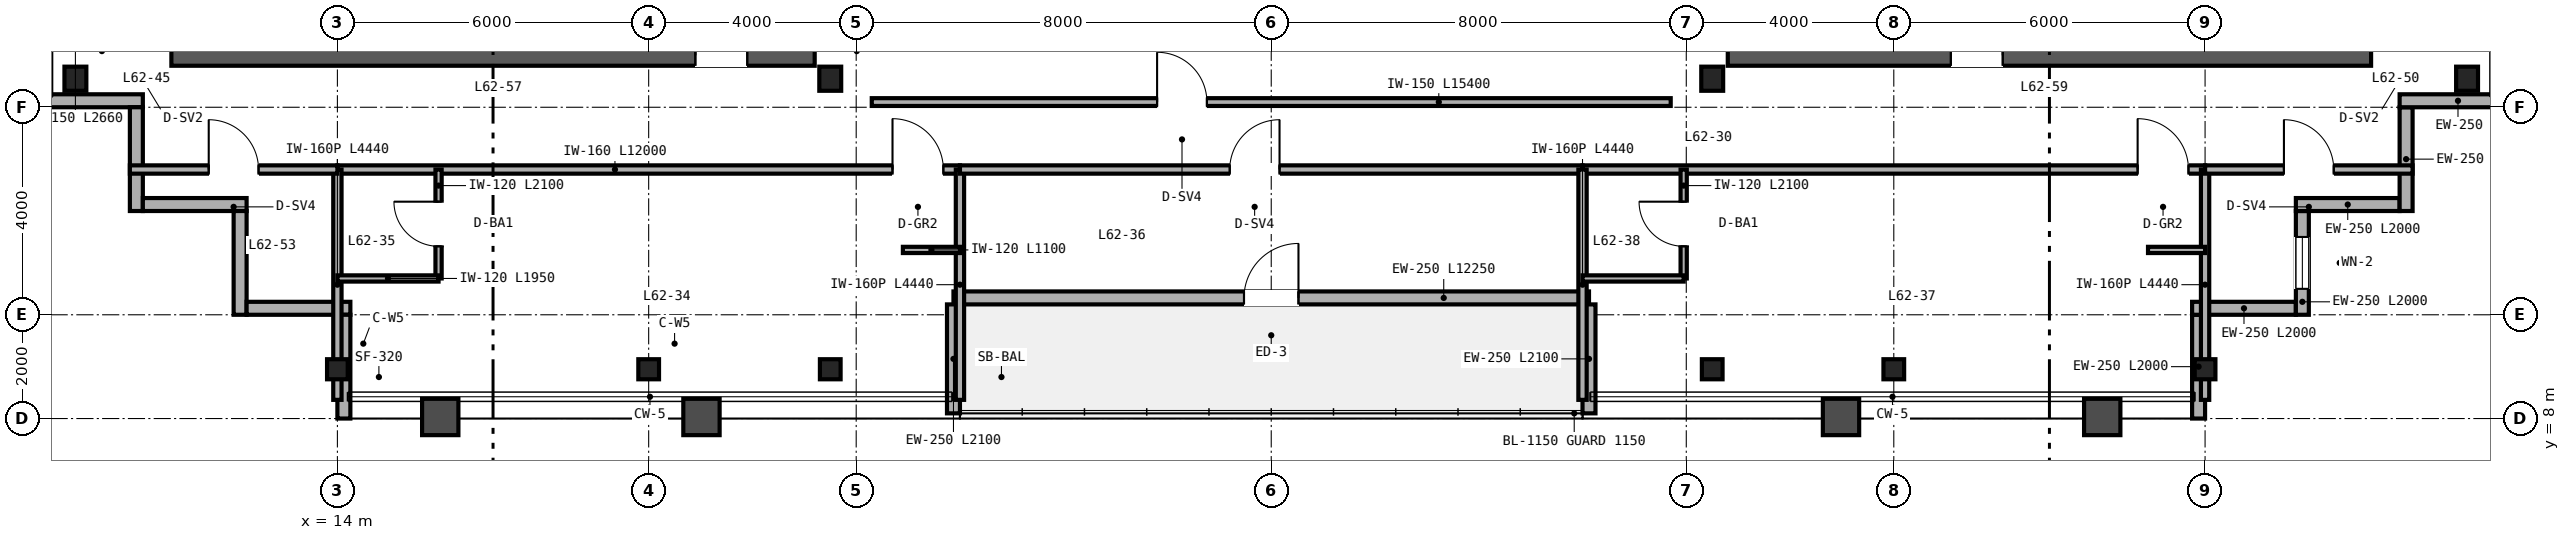
"""IFC4 building model, lengths in metres.
Left out: names, types, materials, properties, quantities, classifications, styles, units other than length and angle.
Written with IfcOpenShell. Run it as: python <this file> out.ifc"""

import sys

from ifc_helpers import new_model, si_unit, direction, frame, frame_2d, origin, origin_2d, place, context, subcontext, project, spatial, rectangle, i_section, extrude, source, transform, mapped, element, fill, save


model = new_model("IFC4")
c1 = context("Model", 3, precision=1e-05, world=origin(), true_north=direction((0.0, 1.0)))
c2 = subcontext(c1, "Body", "Model", "MODEL_VIEW")
j1 = project(units=[si_unit("LENGTHUNIT", "METRE"), si_unit("PLANEANGLEUNIT", "RADIAN")], contexts=[c1])
p1 = place(None, origin())
s1 = spatial("IfcSite", under=j1, at=p1, CompositionType="ELEMENT")
p2 = place(p1, origin())
s2 = spatial("IfcBuilding", under=s1, at=p2, CompositionType="ELEMENT")
p3 = place(p2, frame((0.0, 0.0, 247.2)))
s3 = spatial("IfcBuildingStorey", under=s2, at=p3, CompositionType="ELEMENT", Elevation=247.2)
p4 = place(p3, frame((10.8, 15.0, 0.0), z_axis=(0.0, 0.0, 1.0), x_axis=(1.0, 0.0, 0.0)))
e1 = element("IfcWall", 1, at=p4, inside=s3, PredefinedType="SHEAR", context=c2, shape_type="SweptSolid", body=[
    extrude(rectangle(XDim=12.4, YDim=0.4, at=frame_2d((6.2, 0.0))), origin(), (0.0, 0.0, 1.0), 3.38),
])
p5 = place(p4, frame((10.1, 0.0, 0.0)))
e2 = element("IfcOpeningElement", 2, at=p5, cuts=e1, PredefinedType="OPENING", context=c2, shape_type="SweptSolid", body=[
    extrude(rectangle(XDim=1.0, YDim=2.15, at=frame_2d((0.5, 1.075))), frame((0.0, 0.21, 0.0), z_axis=(0.0, -1.0, 0.0), x_axis=(1.0, 0.0, 0.0)), (0.0, 0.0, 1.0), 0.42),
])
p6 = place(p3, frame((40.8, 15.0, 0.0), z_axis=(0.0, 0.0, 1.0), x_axis=(1.0, 0.0, 0.0)))
e3 = element("IfcWall", 3, at=p6, inside=s3, PredefinedType="SHEAR", context=c2, shape_type="SweptSolid", body=[
    extrude(rectangle(XDim=12.4, YDim=0.4, at=frame_2d((6.2, 0.0))), origin(), (0.0, 0.0, 1.0), 3.38),
])
p7 = place(p6, frame((4.3, 0.0, 0.0)))
e4 = element("IfcOpeningElement", 4, at=p7, cuts=e3, PredefinedType="OPENING", context=c2, shape_type="SweptSolid", body=[
    extrude(rectangle(XDim=1.0, YDim=2.15, at=frame_2d((0.5, 1.075))), frame((0.0, 0.21, 0.0), z_axis=(0.0, -1.0, 0.0), x_axis=(1.0, 0.0, 0.0)), (0.0, 0.0, 1.0), 0.42),
])
m1 = source(origin(), c2, "Body", "SweptSolid", [
    extrude(i_section(OverallWidth=0.422, OverallDepth=0.465, WebThickness=0.045, FlangeThickness=0.073, FilletRadius=0.025, at=origin_2d()), origin(), (0.0, 0.0, 1.0), 3.38),
])
for number, where, z_axis, x_axis in (
    (5, (8.95, 14.55, 0.0), (0.0, 0.0, 1.0), (1.0, 0.0, 0.0)),
    (6, (23.5, 14.55, 0.0), (0.0, 0.0, 1.0), (1.0, 0.0, 0.0)),
    (7, (40.5, 14.55, 0.0), (0.0, 0.0, 1.0), (1.0, 0.0, 0.0)),
    (8, (55.05, 14.55, 0.0), (0.0, 0.0, 1.0), (1.0, 0.0, 0.0)),
):
    element("IfcColumn", number, at=place(p3, frame(where, z_axis=z_axis, x_axis=x_axis)), inside=s3, PredefinedType="COLUMN", context=c2, shape_type="MappedRepresentation", body=[
        mapped(m1, transform((0.0, 0.0, 0.0), scale=1.0)),
    ])
m2 = source(origin(), c2, "Body", "SweptSolid", [
    extrude(i_section(OverallWidth=0.399, OverallDepth=0.387, WebThickness=0.021, FlangeThickness=0.033, FilletRadius=0.025, at=origin_2d()), origin(), (0.0, 0.0, 1.0), 3.38),
])
for number, where, z_axis, x_axis in (
    (9, (14.0, 8.95, 0.0), (0.0, 0.0, 1.0), (1.0, 0.0, 0.0)),
    (10, (20.0, 8.95, 0.0), (0.0, 0.0, 1.0), (1.0, 0.0, 0.0)),
    (11, (23.5, 8.95, 0.0), (0.0, 0.0, 1.0), (1.0, 0.0, 0.0)),
    (12, (40.5, 8.95, 0.0), (0.0, 0.0, 1.0), (1.0, 0.0, 0.0)),
    (13, (44.0, 8.95, 0.0), (0.0, 0.0, 1.0), (1.0, 0.0, 0.0)),
    (14, (50.0, 8.95, 0.0), (0.0, 0.0, 1.0), (1.0, 0.0, 0.0)),
):
    element("IfcColumn", number, at=place(p3, frame(where, z_axis=z_axis, x_axis=x_axis)), inside=s3, PredefinedType="COLUMN", context=c2, shape_type="MappedRepresentation", body=[
        mapped(m2, transform((0.0, 0.0, 0.0), scale=1.0)),
    ])
p8 = place(p3, frame((49.875, 8.0, 0.0), z_axis=(0.0, 0.0, 1.0), x_axis=(0.0, 1.0, 0.0)))
e15 = element("IfcWall", 15, at=p8, inside=s3, PredefinedType="SOLIDWALL", context=c2, shape_type="SweptSolid", body=[
    extrude(rectangle(XDim=2.0, YDim=0.25, at=frame_2d((1.0, 0.0))), origin(), (0.0, 0.0, 1.0), 2.687),
])
p9 = place(p3, frame((49.75, 10.125, 0.0), z_axis=(0.0, 0.0, 1.0), x_axis=(1.0, 0.0, 0.0)))
e16 = element("IfcWall", 16, at=p9, inside=s3, PredefinedType="SOLIDWALL", context=c2, shape_type="SweptSolid", body=[
    extrude(rectangle(XDim=2.0, YDim=0.25, at=frame_2d((1.0, 0.0))), origin(), (0.0, 0.0, 1.0), 3.38),
])
p10 = place(p3, frame((51.875, 10.0, 0.0), z_axis=(0.0, 0.0, 1.0), x_axis=(0.0, 1.0, 0.0)))
e17 = element("IfcWall", 17, at=p10, inside=s3, PredefinedType="SOLIDWALL", context=c2, shape_type="SweptSolid", body=[
    extrude(rectangle(XDim=2.0, YDim=0.25, at=frame_2d((1.0, 0.0))), origin(), (0.0, 0.0, 1.0), 3.38),
])
p11 = place(p10, frame((0.5, 0.0, 0.85)))
e18 = element("IfcOpeningElement", 18, at=p11, cuts=e17, PredefinedType="OPENING", context=c2, shape_type="SweptSolid", body=[
    extrude(rectangle(XDim=1.0, YDim=1.9, at=frame_2d((0.5, 0.95))), frame((0.0, 0.135, 0.0), z_axis=(0.0, -1.0, 0.0), x_axis=(1.0, 0.0, 0.0)), (0.0, 0.0, 1.0), 0.27),
])
for number, where, z_axis, x_axis in (
    (19, (51.75, 12.125, 0.0), (0.0, 0.0, 1.0), (1.0, 0.0, 0.0)),
    (20, (53.875, 12.0, 0.0), (0.0, 0.0, 1.0), (0.0, 1.0, 0.0)),
):
    element("IfcWall", number, at=place(p3, frame(where, z_axis=z_axis, x_axis=x_axis)), inside=s3, PredefinedType="SOLIDWALL", context=c2, shape_type="SweptSolid", body=[
        extrude(rectangle(XDim=2.0, YDim=0.25, at=frame_2d((1.0, 0.0))), origin(), (0.0, 0.0, 1.0), 3.38),
    ])
for number, where, z_axis, x_axis in (
    (21, (53.75, 14.125, 0.0), (0.0, 0.0, 1.0), (1.0, 0.0, 0.0)),
    (22, (8.0, 14.125, 0.0), (0.0, 0.0, 1.0), (1.0, 0.0, 0.0)),
):
    element("IfcWall", number, at=place(p3, frame(where, z_axis=z_axis, x_axis=x_axis)), inside=s3, PredefinedType="SOLIDWALL", context=c2, shape_type="SweptSolid", body=[
        extrude(rectangle(XDim=2.25, YDim=0.25, at=frame_2d((1.125, 0.0))), origin(), (0.0, 0.0, 1.0), 3.38),
    ])
for number, where, z_axis, x_axis in (
    (23, (10.125, 14.0, 0.0), (0.0, 0.0, 1.0), (0.0, -1.0, 0.0)),
    (24, (10.25, 12.125, 0.0), (0.0, 0.0, 1.0), (1.0, 0.0, 0.0)),
    (25, (12.125, 12.0, 0.0), (0.0, 0.0, 1.0), (0.0, -1.0, 0.0)),
    (26, (12.25, 10.125, 0.0), (0.0, 0.0, 1.0), (1.0, 0.0, 0.0)),
):
    element("IfcWall", number, at=place(p3, frame(where, z_axis=z_axis, x_axis=x_axis)), inside=s3, PredefinedType="SOLIDWALL", context=c2, shape_type="SweptSolid", body=[
        extrude(rectangle(XDim=2.0, YDim=0.25, at=frame_2d((1.0, 0.0))), origin(), (0.0, 0.0, 1.0), 3.38),
    ])
p12 = place(p3, frame((14.125, 10.0, 0.0), z_axis=(0.0, 0.0, 1.0), x_axis=(0.0, -1.0, 0.0)))
e27 = element("IfcWall", 27, at=p12, inside=s3, PredefinedType="SOLIDWALL", context=c2, shape_type="SweptSolid", body=[
    extrude(rectangle(XDim=2.0, YDim=0.25, at=frame_2d((1.0, 0.0))), origin(), (0.0, 0.0, 1.0), 2.687),
])
p13 = place(p3, frame((25.875, 10.325, 0.0), z_axis=(0.0, 0.0, 1.0), x_axis=(1.0, 0.0, 0.0)))
e28 = element("IfcWall", 28, at=p13, inside=s3, PredefinedType="SOLIDWALL", context=c2, shape_type="SweptSolid", body=[
    extrude(rectangle(XDim=12.25, YDim=0.25, at=frame_2d((6.125, 0.0))), origin(), (0.0, 0.0, 1.0), 3.38),
])
p14 = place(p13, frame((5.6, 0.0, 0.0)))
e29 = element("IfcOpeningElement", 29, at=p14, cuts=e28, PredefinedType="OPENING", context=c2, shape_type="SweptSolid", body=[
    extrude(rectangle(XDim=1.05, YDim=2.15, at=frame_2d((0.525, 1.075))), frame((0.0, 0.135, 0.0), z_axis=(0.0, -1.0, 0.0), x_axis=(1.0, 0.0, 0.0)), (0.0, 0.0, 1.0), 0.27),
])
for number, where, z_axis, x_axis in (
    (30, (25.875, 8.1, 0.0), (0.0, 0.0, 1.0), (0.0, 1.0, 0.0)),
    (31, (38.125, 8.1, 0.0), (0.0, 0.0, 1.0), (0.0, 1.0, 0.0)),
):
    element("IfcWall", number, at=place(p3, frame(where, z_axis=z_axis, x_axis=x_axis)), inside=s3, PredefinedType="SOLIDWALL", context=c2, shape_type="SweptSolid", body=[
        extrude(rectangle(XDim=2.1, YDim=0.25, at=frame_2d((1.05, 0.0))), origin(), (0.0, 0.0, 1.0), 2.432),
    ])
p15 = place(p3, frame((24.3, 14.1, 0.0), z_axis=(0.0, 0.0, 1.0), x_axis=(1.0, 0.0, 0.0)))
e32 = element("IfcWall", 32, at=p15, inside=s3, PredefinedType="PARTITIONING", context=c2, shape_type="SweptSolid", body=[
    extrude(rectangle(XDim=15.4, YDim=0.15, at=frame_2d((7.7, 0.0))), origin(), (0.0, 0.0, 1.0), 2.923),
])
p16 = place(p15, frame((5.5, 0.0, 0.0)))
e33 = element("IfcOpeningElement", 33, at=p16, cuts=e32, PredefinedType="OPENING", context=c2, shape_type="SweptSolid", body=[
    extrude(rectangle(XDim=0.96, YDim=2.15, at=frame_2d((0.48, 1.075))), frame((0.0, 0.085, 0.0), z_axis=(0.0, -1.0, 0.0), x_axis=(1.0, 0.0, 0.0)), (0.0, 0.0, 1.0), 0.17),
])
p17 = place(p3, frame((14.0, 12.8, 0.0), z_axis=(0.0, 0.0, 1.0), x_axis=(1.0, 0.0, 0.0)))
e34 = element("IfcWall", 34, at=p17, inside=s3, PredefinedType="PARTITIONING", context=c2, shape_type="SweptSolid", body=[
    extrude(rectangle(XDim=12.0, YDim=0.16, at=frame_2d((6.0, 0.0))), origin(), (0.0, 0.0, 1.0), 2.923),
])
p18 = place(p17, frame((10.7, 0.0, 0.0)))
e35 = element("IfcOpeningElement", 35, at=p18, cuts=e34, PredefinedType="OPENING", context=c2, shape_type="SweptSolid", body=[
    extrude(rectangle(XDim=0.98, YDim=2.2, at=frame_2d((0.49, 1.1))), frame((0.0, 0.09, 0.0), z_axis=(0.0, -1.0, 0.0), x_axis=(1.0, 0.0, 0.0)), (0.0, 0.0, 1.0), 0.18),
])
p19 = place(p3, frame((14.0, 8.36, 0.0), z_axis=(0.0, 0.0, 1.0), x_axis=(0.0, 1.0, 0.0)))
e36 = element("IfcWall", 36, at=p19, inside=s3, PredefinedType="PARTITIONING", context=c2, shape_type="SweptSolid", body=[
    extrude(rectangle(XDim=4.44, YDim=0.16, at=frame_2d((2.22, 0.0))), origin(), (0.0, 0.0, 1.0), 2.687),
])
p20 = place(p3, frame((26.0, 8.36, 0.0), z_axis=(0.0, 0.0, 1.0), x_axis=(0.0, 1.0, 0.0)))
e37 = element("IfcWall", 37, at=p20, inside=s3, PredefinedType="PARTITIONING", context=c2, shape_type="SweptSolid", body=[
    extrude(rectangle(XDim=4.44, YDim=0.16, at=frame_2d((2.22, 0.0))), origin(), (0.0, 0.0, 1.0), 2.432),
])
p21 = place(p3, frame((15.95, 10.7, 0.0), z_axis=(0.0, 0.0, 1.0), x_axis=(0.0, 1.0, 0.0)))
e38 = element("IfcWall", 38, at=p21, inside=s3, PredefinedType="PARTITIONING", context=c2, shape_type="SweptSolid", body=[
    extrude(rectangle(XDim=2.1, YDim=0.12, at=frame_2d((1.05, 0.0))), origin(), (0.0, 0.0, 1.0), 3.38),
])
p22 = place(p21, frame((0.62, 0.0, 0.0)))
e39 = element("IfcOpeningElement", 39, at=p22, cuts=e38, PredefinedType="OPENING", context=c2, shape_type="SweptSolid", body=[
    extrude(rectangle(XDim=0.86, YDim=2.1, at=frame_2d((0.43, 1.05))), frame((0.0, 0.07, 0.0), z_axis=(0.0, -1.0, 0.0), x_axis=(1.0, 0.0, 0.0)), (0.0, 0.0, 1.0), 0.14),
])
p23 = place(p3, frame((14.0, 10.7, 0.0), z_axis=(0.0, 0.0, 1.0), x_axis=(1.0, 0.0, 0.0)))
e40 = element("IfcWall", 40, at=p23, inside=s3, PredefinedType="PARTITIONING", context=c2, shape_type="SweptSolid", body=[
    extrude(rectangle(XDim=1.95, YDim=0.12, at=frame_2d((0.975, 0.0))), origin(), (0.0, 0.0, 1.0), 3.38),
])
p24 = place(p3, frame((24.9, 11.25, 0.0), z_axis=(0.0, 0.0, 1.0), x_axis=(1.0, 0.0, 0.0)))
e41 = element("IfcWall", 41, at=p24, inside=s3, PredefinedType="PARTITIONING", context=c2, shape_type="SweptSolid", body=[
    extrude(rectangle(XDim=1.1, YDim=0.12, at=frame_2d((0.55, 0.0))), origin(), (0.0, 0.0, 1.0), 3.38),
])
p25 = place(p3, frame((26.0, 12.8, 0.0), z_axis=(0.0, 0.0, 1.0), x_axis=(1.0, 0.0, 0.0)))
e42 = element("IfcWall", 42, at=p25, inside=s3, PredefinedType="PARTITIONING", context=c2, shape_type="SweptSolid", body=[
    extrude(rectangle(XDim=12.0, YDim=0.16, at=frame_2d((6.0, 0.0))), origin(), (0.0, 0.0, 1.0), 3.38),
])
p26 = place(p25, frame((5.2, 0.0, 0.0)))
e43 = element("IfcOpeningElement", 43, at=p26, cuts=e42, PredefinedType="OPENING", context=c2, shape_type="SweptSolid", body=[
    extrude(rectangle(XDim=0.96, YDim=2.15, at=frame_2d((0.48, 1.075))), frame((0.0, 0.09, 0.0), z_axis=(0.0, -1.0, 0.0), x_axis=(1.0, 0.0, 0.0)), (0.0, 0.0, 1.0), 0.18),
])
p27 = place(p3, frame((38.0, 12.8, 0.0), z_axis=(0.0, 0.0, 1.0), x_axis=(1.0, 0.0, 0.0)))
e44 = element("IfcWall", 44, at=p27, inside=s3, PredefinedType="PARTITIONING", context=c2, shape_type="SweptSolid", body=[
    extrude(rectangle(XDim=12.0, YDim=0.16, at=frame_2d((6.0, 0.0))), origin(), (0.0, 0.0, 1.0), 2.923),
])
p28 = place(p27, frame((10.7, 0.0, 0.0)))
e45 = element("IfcOpeningElement", 45, at=p28, cuts=e44, PredefinedType="OPENING", context=c2, shape_type="SweptSolid", body=[
    extrude(rectangle(XDim=0.98, YDim=2.2, at=frame_2d((0.49, 1.1))), frame((0.0, 0.09, 0.0), z_axis=(0.0, -1.0, 0.0), x_axis=(1.0, 0.0, 0.0)), (0.0, 0.0, 1.0), 0.18),
])
p29 = place(p3, frame((38.0, 8.36, 0.0), z_axis=(0.0, 0.0, 1.0), x_axis=(0.0, 1.0, 0.0)))
e46 = element("IfcWall", 46, at=p29, inside=s3, PredefinedType="PARTITIONING", context=c2, shape_type="SweptSolid", body=[
    extrude(rectangle(XDim=4.44, YDim=0.16, at=frame_2d((2.22, 0.0))), origin(), (0.0, 0.0, 1.0), 2.432),
])
p30 = place(p3, frame((50.0, 8.36, 0.0), z_axis=(0.0, 0.0, 1.0), x_axis=(0.0, 1.0, 0.0)))
e47 = element("IfcWall", 47, at=p30, inside=s3, PredefinedType="PARTITIONING", context=c2, shape_type="SweptSolid", body=[
    extrude(rectangle(XDim=4.44, YDim=0.16, at=frame_2d((2.22, 0.0))), origin(), (0.0, 0.0, 1.0), 2.687),
])
p31 = place(p3, frame((39.95, 10.7, 0.0), z_axis=(0.0, 0.0, 1.0), x_axis=(0.0, 1.0, 0.0)))
e48 = element("IfcWall", 48, at=p31, inside=s3, PredefinedType="PARTITIONING", context=c2, shape_type="SweptSolid", body=[
    extrude(rectangle(XDim=2.1, YDim=0.12, at=frame_2d((1.05, 0.0))), origin(), (0.0, 0.0, 1.0), 3.38),
])
p32 = place(p31, frame((0.62, 0.0, 0.0)))
e49 = element("IfcOpeningElement", 49, at=p32, cuts=e48, PredefinedType="OPENING", context=c2, shape_type="SweptSolid", body=[
    extrude(rectangle(XDim=0.86, YDim=2.1, at=frame_2d((0.43, 1.05))), frame((0.0, 0.07, 0.0), z_axis=(0.0, -1.0, 0.0), x_axis=(1.0, 0.0, 0.0)), (0.0, 0.0, 1.0), 0.14),
])
p33 = place(p3, frame((38.0, 10.7, 0.0), z_axis=(0.0, 0.0, 1.0), x_axis=(1.0, 0.0, 0.0)))
e50 = element("IfcWall", 50, at=p33, inside=s3, PredefinedType="PARTITIONING", context=c2, shape_type="SweptSolid", body=[
    extrude(rectangle(XDim=1.95, YDim=0.12, at=frame_2d((0.975, 0.0))), origin(), (0.0, 0.0, 1.0), 3.38),
])
p34 = place(p3, frame((48.9, 11.25, 0.0), z_axis=(0.0, 0.0, 1.0), x_axis=(1.0, 0.0, 0.0)))
e51 = element("IfcWall", 51, at=p34, inside=s3, PredefinedType="PARTITIONING", context=c2, shape_type="SweptSolid", body=[
    extrude(rectangle(XDim=1.1, YDim=0.12, at=frame_2d((0.55, 0.0))), origin(), (0.0, 0.0, 1.0), 3.38),
])
p35 = place(p3, frame((10.0, 12.8, 0.0), z_axis=(0.0, 0.0, 1.0), x_axis=(1.0, 0.0, 0.0)))
e52 = element("IfcWall", 52, at=p35, inside=s3, PredefinedType="PARTITIONING", context=c2, shape_type="SweptSolid", body=[
    extrude(rectangle(XDim=4.0, YDim=0.16, at=frame_2d((2.0, 0.0))), origin(), (0.0, 0.0, 1.0), 3.38),
])
p36 = place(p35, frame((1.52, 0.0, 0.0)))
e53 = element("IfcOpeningElement", 53, at=p36, cuts=e52, PredefinedType="OPENING", context=c2, shape_type="SweptSolid", body=[
    extrude(rectangle(XDim=0.96, YDim=2.15, at=frame_2d((0.48, 1.075))), frame((0.0, 0.09, 0.0), z_axis=(0.0, -1.0, 0.0), x_axis=(1.0, 0.0, 0.0)), (0.0, 0.0, 1.0), 0.18),
])
p37 = place(p3, frame((50.0, 12.8, 0.0), z_axis=(0.0, 0.0, 1.0), x_axis=(1.0, 0.0, 0.0)))
e54 = element("IfcWall", 54, at=p37, inside=s3, PredefinedType="PARTITIONING", context=c2, shape_type="SweptSolid", body=[
    extrude(rectangle(XDim=4.0, YDim=0.16, at=frame_2d((2.0, 0.0))), origin(), (0.0, 0.0, 1.0), 3.38),
])
p38 = place(p37, frame((1.52, 0.0, 0.0)))
e55 = element("IfcOpeningElement", 55, at=p38, cuts=e54, PredefinedType="OPENING", context=c2, shape_type="SweptSolid", body=[
    extrude(rectangle(XDim=0.96, YDim=2.15, at=frame_2d((0.48, 1.075))), frame((0.0, 0.09, 0.0), z_axis=(0.0, -1.0, 0.0), x_axis=(1.0, 0.0, 0.0)), (0.0, 0.0, 1.0), 0.18),
])
m3 = source(origin(), c2, "Body", "SweptSolid", [
    extrude(rectangle(XDim=1.0, YDim=1.9, at=frame_2d((0.5, 0.95))), frame((0.0, 0.03, 0.0), z_axis=(0.0, -1.0, 0.0), x_axis=(1.0, 0.0, 0.0)), (0.0, 0.0, 1.0), 0.06),
])
p39 = place(p11, origin())
e56 = element("IfcWindow", 56, at=p39, inside=s3, PartitioningType="SINGLE_PANEL", PredefinedType="WINDOW", context=c2, shape_type="MappedRepresentation", body=[
    mapped(m3, transform((0.0, 0.0, 0.0), scale=1.0)),
])
fill(e18, e56)
m4 = source(origin(), c2, "Body", "SweptSolid", [
    extrude(rectangle(XDim=1.05, YDim=2.15, at=frame_2d((0.525, 1.075))), frame((0.0, 0.025, 0.0), z_axis=(0.0, -1.0, 0.0), x_axis=(1.0, 0.0, 0.0)), (0.0, 0.0, 1.0), 0.05),
])
p40 = place(p14, origin())
e57 = element("IfcDoor", 57, at=p40, inside=s3, OperationType="SINGLE_SWING_RIGHT", PredefinedType="DOOR", context=c2, shape_type="MappedRepresentation", body=[
    mapped(m4, transform((0.0, 0.0, 0.0), scale=1.0)),
])
fill(e29, e57)
m5 = source(origin(), c2, "Body", "SweptSolid", [
    extrude(rectangle(XDim=1.0, YDim=2.15, at=frame_2d((0.5, 1.075))), frame((0.0, 0.025, 0.0), z_axis=(0.0, -1.0, 0.0), x_axis=(1.0, 0.0, 0.0)), (0.0, 0.0, 1.0), 0.05),
])
p41 = place(p5, origin())
e58 = element("IfcDoor", 58, at=p41, inside=s3, OperationType="SINGLE_SWING_LEFT", PredefinedType="DOOR", context=c2, shape_type="MappedRepresentation", body=[
    mapped(m5, transform((0.0, 0.0, 0.0), scale=1.0)),
])
fill(e2, e58)
p42 = place(p7, origin())
e59 = element("IfcDoor", 59, at=p42, inside=s3, OperationType="SINGLE_SWING_RIGHT", PredefinedType="DOOR", context=c2, shape_type="MappedRepresentation", body=[
    mapped(m5, transform((0.0, 0.0, 0.0), scale=1.0)),
])
fill(e4, e59)
m6 = source(origin(), c2, "Body", "SweptSolid", [
    extrude(rectangle(XDim=0.96, YDim=2.15, at=frame_2d((0.48, 1.075))), frame((0.0, 0.025, 0.0), z_axis=(0.0, -1.0, 0.0), x_axis=(1.0, 0.0, 0.0)), (0.0, 0.0, 1.0), 0.05),
])
p43 = place(p16, origin())
e60 = element("IfcDoor", 60, at=p43, inside=s3, OperationType="SINGLE_SWING_LEFT", PredefinedType="DOOR", context=c2, shape_type="MappedRepresentation", body=[
    mapped(m6, transform((0.0, 0.0, 0.0), scale=1.0)),
])
fill(e33, e60)
m7 = source(origin(), c2, "Body", "SweptSolid", [
    extrude(rectangle(XDim=0.86, YDim=2.1, at=frame_2d((0.43, 1.05))), frame((0.0, 0.025, 0.0), z_axis=(0.0, -1.0, 0.0), x_axis=(1.0, 0.0, 0.0)), (0.0, 0.0, 1.0), 0.05),
])
p44 = place(p22, origin())
e61 = element("IfcDoor", 61, at=p44, inside=s3, OperationType="SINGLE_SWING_RIGHT", PredefinedType="DOOR", context=c2, shape_type="MappedRepresentation", body=[
    mapped(m7, transform((0.0, 0.0, 0.0), scale=1.0)),
])
fill(e39, e61)
m8 = source(origin(), c2, "Body", "SweptSolid", [
    extrude(rectangle(XDim=0.98, YDim=2.2, at=frame_2d((0.49, 1.1))), frame((0.0, 0.025, 0.0), z_axis=(0.0, -1.0, 0.0), x_axis=(1.0, 0.0, 0.0)), (0.0, 0.0, 1.0), 0.05),
])
p45 = place(p18, origin())
e62 = element("IfcDoor", 62, at=p45, inside=s3, OperationType="SINGLE_SWING_LEFT", PredefinedType="DOOR", context=c2, shape_type="MappedRepresentation", body=[
    mapped(m8, transform((0.0, 0.0, 0.0), scale=1.0)),
])
fill(e35, e62)
p46 = place(p26, origin())
e63 = element("IfcDoor", 63, at=p46, inside=s3, OperationType="SINGLE_SWING_RIGHT", PredefinedType="DOOR", context=c2, shape_type="MappedRepresentation", body=[
    mapped(m6, transform((0.0, 0.0, 0.0), scale=1.0)),
])
fill(e43, e63)
p47 = place(p32, origin())
e64 = element("IfcDoor", 64, at=p47, inside=s3, OperationType="SINGLE_SWING_RIGHT", PredefinedType="DOOR", context=c2, shape_type="MappedRepresentation", body=[
    mapped(m7, transform((0.0, 0.0, 0.0), scale=1.0)),
])
fill(e49, e64)
p48 = place(p28, origin())
e65 = element("IfcDoor", 65, at=p48, inside=s3, OperationType="SINGLE_SWING_LEFT", PredefinedType="DOOR", context=c2, shape_type="MappedRepresentation", body=[
    mapped(m8, transform((0.0, 0.0, 0.0), scale=1.0)),
])
fill(e45, e65)
p49 = place(p36, origin())
e66 = element("IfcDoor", 66, at=p49, inside=s3, OperationType="SINGLE_SWING_LEFT", PredefinedType="DOOR", context=c2, shape_type="MappedRepresentation", body=[
    mapped(m6, transform((0.0, 0.0, 0.0), scale=1.0)),
])
fill(e53, e66)
p50 = place(p38, origin())
e67 = element("IfcDoor", 67, at=p50, inside=s3, OperationType="SINGLE_SWING_LEFT", PredefinedType="DOOR", context=c2, shape_type="MappedRepresentation", body=[
    mapped(m6, transform((0.0, 0.0, 0.0), scale=1.0)),
])
fill(e55, e67)
save(model, sys.argv[1])
